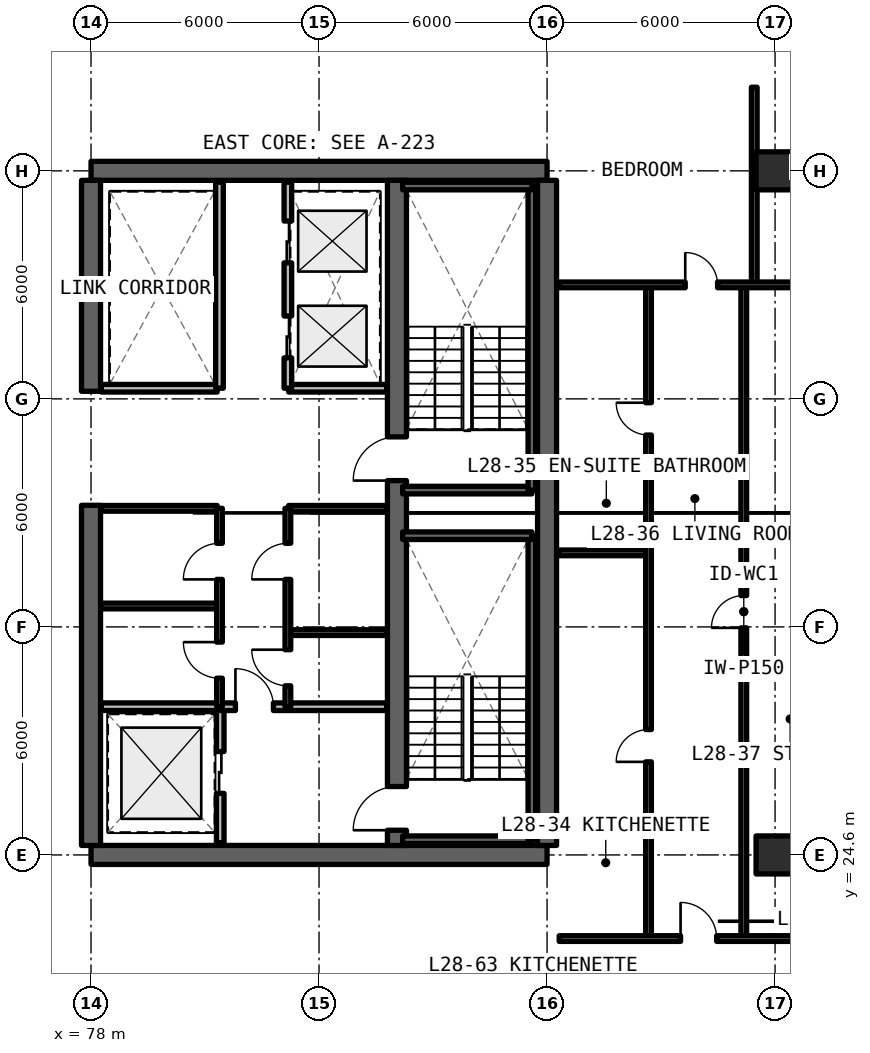
"""IFC4 building model, lengths in metres.
Left out: names, types, materials, properties, quantities, classifications, styles, units other than length and angle.
Written with IfcOpenShell. Run it as: python <this file> out.ifc"""

import sys

from ifc_helpers import new_model, si_unit, direction, frame, frame_2d, origin, origin_2d, place, context, subcontext, project, spatial, rectangle, extrude, element, fill, save


model = new_model("IFC4")
c1 = context("Model", 3, precision=1e-05, world=origin(), true_north=direction((0.0, 1.0)))
c2 = subcontext(c1, "Body", "Model", "MODEL_VIEW")
j1 = project(units=[si_unit("LENGTHUNIT", "METRE"), si_unit("PLANEANGLEUNIT", "RADIAN")], contexts=[c1])
p1 = place(None, origin())
s1 = spatial("IfcSite", under=j1, at=p1, CompositionType="ELEMENT")
p2 = place(p1, origin())
s2 = spatial("IfcBuilding", under=s1, at=p2, CompositionType="ELEMENT")
p3 = place(p2, frame((0.0, 0.0, 101.97)))
s3 = spatial("IfcBuildingStorey", under=s2, at=p3, CompositionType="ELEMENT", Elevation=101.97)
for number, where, z_axis, x_axis in (
    (1, (78.0, 24.6, 0.0), (0.0, 0.0, 1.0), (1.0, 0.0, 0.0)),
    (2, (90.0, 42.6, 0.0), (0.0, 0.0, 1.0), (-1.0, 0.0, 0.0)),
):
    element("IfcWall", number, at=place(p3, frame(where, z_axis=z_axis, x_axis=x_axis)), inside=s3, PredefinedType="SHEAR", context=c2, shape_type="SweptSolid", body=[
        extrude(rectangle(XDim=12.0, YDim=0.5, at=frame_2d((6.0, 0.0))), origin(), (0.0, 0.0, 1.0), 3.3),
    ])
p4 = place(p3, frame((90.0, 24.85, 0.0), z_axis=(0.0, 0.0, 1.0), x_axis=(0.0, 1.0, 0.0)))
e3 = element("IfcWall", 3, at=p4, inside=s3, PredefinedType="SHEAR", context=c2, shape_type="SweptSolid", body=[
    extrude(rectangle(XDim=17.5, YDim=0.5, at=frame_2d((8.75, 0.0))), origin(), (0.0, 0.0, 1.0), 3.3),
])
p5 = place(p3, frame((78.0, 24.85, 0.0), z_axis=(0.0, 0.0, 1.0), x_axis=(0.0, 1.0, 0.0)))
e4 = element("IfcWall", 4, at=p5, inside=s3, PredefinedType="SHEAR", context=c2, shape_type="SweptSolid", body=[
    extrude(rectangle(XDim=8.95, YDim=0.5, at=frame_2d((4.475, 0.0))), origin(), (0.0, 0.0, 1.0), 3.3),
])
p6 = place(p3, frame((78.0, 36.8, 0.0), z_axis=(0.0, 0.0, 1.0), x_axis=(0.0, 1.0, 0.0)))
e5 = element("IfcWall", 5, at=p6, inside=s3, PredefinedType="SHEAR", context=c2, shape_type="SweptSolid", body=[
    extrude(rectangle(XDim=5.55, YDim=0.5, at=frame_2d((2.775, 0.0))), origin(), (0.0, 0.0, 1.0), 3.3),
])
p7 = place(p3, frame((86.05, 24.85, 0.0), z_axis=(0.0, 0.0, 1.0), x_axis=(0.0, 1.0, 0.0)))
e6 = element("IfcWall", 6, at=p7, inside=s3, PredefinedType="SHEAR", context=c2, shape_type="SweptSolid", body=[
    extrude(rectangle(XDim=17.5, YDim=0.5, at=frame_2d((8.75, 0.0))), origin(), (0.0, 0.0, 1.0), 3.3),
])
p8 = place(p7, frame((0.4, 0.0, 0.0)))
e7 = element("IfcOpeningElement", 7, at=p8, cuts=e6, PredefinedType="OPENING", context=c2, shape_type="SweptSolid", body=[
    extrude(rectangle(XDim=1.15, YDim=2.15, at=frame_2d((0.575, 1.075))), frame((0.0, 0.26, 0.0), z_axis=(0.0, -1.0, 0.0), x_axis=(1.0, 0.0, 0.0)), (0.0, 0.0, 1.0), 0.52),
])
p9 = place(p7, frame((9.6, 0.0, 0.0)))
e8 = element("IfcOpeningElement", 8, at=p9, cuts=e6, PredefinedType="OPENING", context=c2, shape_type="SweptSolid", body=[
    extrude(rectangle(XDim=1.15, YDim=2.15, at=frame_2d((0.575, 1.075))), frame((0.0, 0.26, 0.0), z_axis=(0.0, -1.0, 0.0), x_axis=(1.0, 0.0, 0.0)), (0.0, 0.0, 1.0), 0.52),
])
for number, where, z_axis, x_axis in (
    (9, (96.0, 24.6, 0.0), (0.0, 0.0, 1.0), (1.0, 0.0, 0.0)),
    (10, (96.0, 42.6, 0.0), (0.0, 0.0, 1.0), (1.0, 0.0, 0.0)),
):
    element("IfcColumn", number, at=place(p3, frame(where, z_axis=z_axis, x_axis=x_axis)), inside=s3, PredefinedType="COLUMN", context=c2, shape_type="SweptSolid", body=[
        extrude(rectangle(XDim=1.0, YDim=1.0, at=origin_2d()), origin(), (0.0, 0.0, 1.0), 3.3),
    ])
p10 = place(p3, frame((81.4, 24.92, 0.0), z_axis=(0.0, 0.0, 1.0), x_axis=(0.0, 1.0, 0.0)))
e11 = element("IfcWall", 11, at=p10, inside=s3, PredefinedType="SOLIDWALL", context=c2, shape_type="SweptSolid", body=[
    extrude(rectangle(XDim=3.58, YDim=0.2, at=frame_2d((1.79, 0.0))), origin(), (0.0, 0.0, 1.0), 2.35),
])
p11 = place(p10, frame((1.3, 0.0, 0.0)))
e12 = element("IfcOpeningElement", 12, at=p11, cuts=e11, PredefinedType="OPENING", context=c2, shape_type="SweptSolid", body=[
    extrude(rectangle(XDim=1.1, YDim=2.2, at=frame_2d((0.55, 1.1))), frame((0.0, 0.11, 0.0), z_axis=(0.0, -1.0, 0.0), x_axis=(1.0, 0.0, 0.0)), (0.0, 0.0, 1.0), 0.22),
])
p12 = place(p3, frame((78.27, 28.5, 0.0), z_axis=(0.0, 0.0, 1.0), x_axis=(1.0, 0.0, 0.0)))
e13 = element("IfcWall", 13, at=p12, inside=s3, PredefinedType="SOLIDWALL", context=c2, shape_type="SweptSolid", body=[
    extrude(rectangle(XDim=7.51, YDim=0.2, at=frame_2d((3.755, 0.0))), origin(), (0.0, 0.0, 1.0), 2.35),
])
p13 = place(p12, frame((3.53, 0.0, 0.0)))
e14 = element("IfcOpeningElement", 14, at=p13, cuts=e13, PredefinedType="OPENING", context=c2, shape_type="SweptSolid", body=[
    extrude(rectangle(XDim=1.0, YDim=2.15, at=frame_2d((0.5, 1.075))), frame((0.0, 0.11, 0.0), z_axis=(0.0, -1.0, 0.0), x_axis=(1.0, 0.0, 0.0)), (0.0, 0.0, 1.0), 0.22),
])
for number, where, z_axis, x_axis in (
    (15, (83.2, 30.45, 0.0), (0.0, 0.0, 1.0), (1.0, 0.0, 0.0)),
    (16, (83.2, 33.72, 0.0), (0.0, 0.0, 1.0), (1.0, 0.0, 0.0)),
):
    element("IfcWall", number, at=place(p3, frame(where, z_axis=z_axis, x_axis=x_axis)), inside=s3, PredefinedType="SOLIDWALL", context=c2, shape_type="SweptSolid", body=[
        extrude(rectangle(XDim=2.58, YDim=0.15, at=frame_2d((1.29, 0.0))), origin(), (0.0, 0.0, 1.0), 2.35),
    ])
p14 = place(p3, frame((83.18, 28.5, 0.0), z_axis=(0.0, 0.0, 1.0), x_axis=(0.0, 1.0, 0.0)))
e17 = element("IfcWall", 17, at=p14, inside=s3, PredefinedType="SOLIDWALL", context=c2, shape_type="SweptSolid", body=[
    extrude(rectangle(XDim=5.22, YDim=0.15, at=frame_2d((2.61, 0.0))), origin(), (0.0, 0.0, 1.0), 2.35),
])
p15 = place(p14, frame((0.55, 0.0, 0.0)))
e18 = element("IfcOpeningElement", 18, at=p15, cuts=e17, PredefinedType="OPENING", context=c2, shape_type="SweptSolid", body=[
    extrude(rectangle(XDim=0.95, YDim=2.15, at=frame_2d((0.475, 1.075))), frame((0.0, 0.085, 0.0), z_axis=(0.0, -1.0, 0.0), x_axis=(1.0, 0.0, 0.0)), (0.0, 0.0, 1.0), 0.17),
])
p16 = place(p14, frame((3.35, 0.0, 0.0)))
e19 = element("IfcOpeningElement", 19, at=p16, cuts=e17, PredefinedType="OPENING", context=c2, shape_type="SweptSolid", body=[
    extrude(rectangle(XDim=0.95, YDim=2.15, at=frame_2d((0.475, 1.075))), frame((0.0, 0.085, 0.0), z_axis=(0.0, -1.0, 0.0), x_axis=(1.0, 0.0, 0.0)), (0.0, 0.0, 1.0), 0.17),
])
for number, where, z_axis, x_axis in (
    (20, (78.27, 31.15, 0.0), (0.0, 0.0, 1.0), (1.0, 0.0, 0.0)),
    (21, (78.27, 33.72, 0.0), (0.0, 0.0, 1.0), (1.0, 0.0, 0.0)),
):
    element("IfcWall", number, at=place(p3, frame(where, z_axis=z_axis, x_axis=x_axis)), inside=s3, PredefinedType="SOLIDWALL", context=c2, shape_type="SweptSolid", body=[
        extrude(rectangle(XDim=3.05, YDim=0.15, at=frame_2d((1.525, 0.0))), origin(), (0.0, 0.0, 1.0), 2.35),
    ])
p17 = place(p3, frame((81.38, 28.5, 0.0), z_axis=(0.0, 0.0, 1.0), x_axis=(0.0, 1.0, 0.0)))
e22 = element("IfcWall", 22, at=p17, inside=s3, PredefinedType="SOLIDWALL", context=c2, shape_type="SweptSolid", body=[
    extrude(rectangle(XDim=5.22, YDim=0.15, at=frame_2d((2.61, 0.0))), origin(), (0.0, 0.0, 1.0), 2.35),
])
p18 = place(p17, frame((0.75, 0.0, 0.0)))
e23 = element("IfcOpeningElement", 23, at=p18, cuts=e22, PredefinedType="OPENING", context=c2, shape_type="SweptSolid", body=[
    extrude(rectangle(XDim=0.95, YDim=2.15, at=frame_2d((0.475, 1.075))), frame((0.0, 0.085, 0.0), z_axis=(0.0, -1.0, 0.0), x_axis=(1.0, 0.0, 0.0)), (0.0, 0.0, 1.0), 0.17),
])
p19 = place(p17, frame((3.35, 0.0, 0.0)))
e24 = element("IfcOpeningElement", 24, at=p19, cuts=e22, PredefinedType="OPENING", context=c2, shape_type="SweptSolid", body=[
    extrude(rectangle(XDim=0.95, YDim=2.15, at=frame_2d((0.475, 1.075))), frame((0.0, 0.085, 0.0), z_axis=(0.0, -1.0, 0.0), x_axis=(1.0, 0.0, 0.0)), (0.0, 0.0, 1.0), 0.17),
])
p20 = place(p3, frame((83.2, 36.88, 0.0), z_axis=(0.0, 0.0, 1.0), x_axis=(1.0, 0.0, 0.0)))
e25 = element("IfcWall", 25, at=p20, inside=s3, PredefinedType="SOLIDWALL", context=c2, shape_type="SweptSolid", body=[
    extrude(rectangle(XDim=2.58, YDim=0.2, at=frame_2d((1.29, 0.0))), origin(), (0.0, 0.0, 1.0), 2.35),
])
p21 = place(p3, frame((83.18, 36.88, 0.0), z_axis=(0.0, 0.0, 1.0), x_axis=(0.0, 1.0, 0.0)))
e26 = element("IfcWall", 26, at=p21, inside=s3, PredefinedType="SOLIDWALL", context=c2, shape_type="SweptSolid", body=[
    extrude(rectangle(XDim=5.42, YDim=0.2, at=frame_2d((2.71, 0.0))), origin(), (0.0, 0.0, 1.0), 2.35),
])
p22 = place(p21, frame((0.8, 0.0, 0.0)))
e27 = element("IfcOpeningElement", 27, at=p22, cuts=e26, PredefinedType="OPENING", context=c2, shape_type="SweptSolid", body=[
    extrude(rectangle(XDim=1.1, YDim=2.2, at=frame_2d((0.55, 1.1))), frame((0.0, 0.11, 0.0), z_axis=(0.0, -1.0, 0.0), x_axis=(1.0, 0.0, 0.0)), (0.0, 0.0, 1.0), 0.22),
])
p23 = place(p21, frame((3.3, 0.0, 0.0)))
e28 = element("IfcOpeningElement", 28, at=p23, cuts=e26, PredefinedType="OPENING", context=c2, shape_type="SweptSolid", body=[
    extrude(rectangle(XDim=1.1, YDim=2.2, at=frame_2d((0.55, 1.1))), frame((0.0, 0.11, 0.0), z_axis=(0.0, -1.0, 0.0), x_axis=(1.0, 0.0, 0.0)), (0.0, 0.0, 1.0), 0.22),
])
p24 = place(p3, frame((78.27, 36.88, 0.0), z_axis=(0.0, 0.0, 1.0), x_axis=(1.0, 0.0, 0.0)))
e29 = element("IfcWall", 29, at=p24, inside=s3, PredefinedType="SOLIDWALL", context=c2, shape_type="SweptSolid", body=[
    extrude(rectangle(XDim=3.05, YDim=0.2, at=frame_2d((1.525, 0.0))), origin(), (0.0, 0.0, 1.0), 2.35),
])
p25 = place(p3, frame((81.38, 36.88, 0.0), z_axis=(0.0, 0.0, 1.0), x_axis=(0.0, 1.0, 0.0)))
e30 = element("IfcWall", 30, at=p25, inside=s3, PredefinedType="SOLIDWALL", context=c2, shape_type="SweptSolid", body=[
    extrude(rectangle(XDim=5.42, YDim=0.2, at=frame_2d((2.71, 0.0))), origin(), (0.0, 0.0, 1.0), 2.35),
])
p26 = place(p3, frame((95.177, 22.4, 0.0), z_axis=(0.0, 0.0, 1.0), x_axis=(0.0, 1.0, 0.0)))
e31 = element("IfcWall", 31, at=p26, inside=s3, PredefinedType="PARTITIONING", context=c2, shape_type="SweptSolid", body=[
    extrude(rectangle(XDim=17.2, YDim=0.15, at=frame_2d((8.6, 0.0))), origin(), (0.0, 0.0, 1.0), 2.35),
])
p27 = place(p26, frame((8.175, 0.0, 0.0)))
e32 = element("IfcOpeningElement", 32, at=p27, cuts=e31, PredefinedType="OPENING", context=c2, shape_type="SweptSolid", body=[
    extrude(rectangle(XDim=0.85, YDim=2.1, at=frame_2d((0.425, 1.05))), frame((0.0, 0.085, 0.0), z_axis=(0.0, -1.0, 0.0), x_axis=(1.0, 0.0, 0.0)), (0.0, 0.0, 1.0), 0.17),
])
p28 = place(p3, frame((90.32, 32.548, 0.0), z_axis=(0.0, 0.0, 1.0), x_axis=(1.0, 0.0, 0.0)))
e33 = element("IfcWall", 33, at=p28, inside=s3, PredefinedType="PARTITIONING", context=c2, shape_type="SweptSolid", body=[
    extrude(rectangle(XDim=2.35, YDim=0.15, at=frame_2d((1.175, 0.0))), origin(), (0.0, 0.0, 1.0), 2.35),
])
p29 = place(p3, frame((92.67, 22.4, 0.0), z_axis=(0.0, 0.0, 1.0), x_axis=(0.0, 1.0, 0.0)))
e34 = element("IfcWall", 34, at=p29, inside=s3, PredefinedType="PARTITIONING", context=c2, shape_type="SweptSolid", body=[
    extrude(rectangle(XDim=17.2, YDim=0.15, at=frame_2d((8.6, 0.0))), origin(), (0.0, 0.0, 1.0), 2.35),
])
p30 = place(p29, frame((4.649, 0.0, 0.0)))
e35 = element("IfcOpeningElement", 35, at=p30, cuts=e34, PredefinedType="OPENING", context=c2, shape_type="SweptSolid", body=[
    extrude(rectangle(XDim=0.85, YDim=2.1, at=frame_2d((0.425, 1.05))), frame((0.0, 0.085, 0.0), z_axis=(0.0, -1.0, 0.0), x_axis=(1.0, 0.0, 0.0)), (0.0, 0.0, 1.0), 0.17),
])
p31 = place(p29, frame((13.249, 0.0, 0.0)))
e36 = element("IfcOpeningElement", 36, at=p31, cuts=e34, PredefinedType="OPENING", context=c2, shape_type="SweptSolid", body=[
    extrude(rectangle(XDim=0.85, YDim=2.1, at=frame_2d((0.425, 1.05))), frame((0.0, 0.085, 0.0), z_axis=(0.0, -1.0, 0.0), x_axis=(1.0, 0.0, 0.0)), (0.0, 0.0, 1.0), 0.17),
])
p32 = place(p3, frame((95.452, 39.6, 0.0), z_axis=(0.0, 0.0, 1.0), x_axis=(0.0, 1.0, 0.0)))
e37 = element("IfcWall", 37, at=p32, inside=s3, PredefinedType="PARTITIONING", context=c2, shape_type="SweptSolid", body=[
    extrude(rectangle(XDim=5.2, YDim=0.15, at=frame_2d((2.6, 0.0))), origin(), (0.0, 0.0, 1.0), 2.35),
])
p33 = place(p3, frame((90.32, 39.6, 0.0), z_axis=(0.0, 0.0, 1.0), x_axis=(1.0, 0.0, 0.0)))
e38 = element("IfcWall", 38, at=p33, inside=s3, PredefinedType="PARTITIONING", context=c2, shape_type="SweptSolid", body=[
    extrude(rectangle(XDim=9.87, YDim=0.15, at=frame_2d((4.935, 0.0))), origin(), (0.0, 0.0, 1.0), 2.35),
])
p34 = place(p33, frame((3.316, 0.0, 0.0)))
e39 = element("IfcOpeningElement", 39, at=p34, cuts=e38, PredefinedType="OPENING", context=c2, shape_type="SweptSolid", body=[
    extrude(rectangle(XDim=0.85, YDim=2.1, at=frame_2d((0.425, 1.05))), frame((0.0, 0.085, 0.0), z_axis=(0.0, -1.0, 0.0), x_axis=(1.0, 0.0, 0.0)), (0.0, 0.0, 1.0), 0.17),
])
p35 = place(p33, frame((7.876, 0.0, 0.0)))
e40 = element("IfcOpeningElement", 40, at=p35, cuts=e38, PredefinedType="OPENING", context=c2, shape_type="SweptSolid", body=[
    extrude(rectangle(XDim=0.85, YDim=2.1, at=frame_2d((0.425, 1.05))), frame((0.0, 0.085, 0.0), z_axis=(0.0, -1.0, 0.0), x_axis=(1.0, 0.0, 0.0)), (0.0, 0.0, 1.0), 0.17),
])
p36 = place(p3, frame((90.32, 22.4, 0.0), z_axis=(0.0, 0.0, 1.0), x_axis=(1.0, 0.0, 0.0)))
e41 = element("IfcWall", 41, at=p36, inside=s3, PredefinedType="SOLIDWALL", context=c2, shape_type="SweptSolid", body=[
    extrude(rectangle(XDim=9.87, YDim=0.15, at=frame_2d((4.935, 0.0))), origin(), (0.0, 0.0, 1.0), 2.35),
])
p37 = place(p36, frame((3.193, 0.0, 0.0)))
e42 = element("IfcOpeningElement", 42, at=p37, cuts=e41, PredefinedType="OPENING", context=c2, shape_type="SweptSolid", body=[
    extrude(rectangle(XDim=0.95, YDim=2.15, at=frame_2d((0.475, 1.075))), frame((0.0, 0.085, 0.0), z_axis=(0.0, -1.0, 0.0), x_axis=(1.0, 0.0, 0.0)), (0.0, 0.0, 1.0), 0.17),
])
p38 = place(p3, frame((86.2, 25.0, 0.0), z_axis=(0.0, 0.0, 1.0), x_axis=(1.0, 0.0, 0.0)))
e43 = element("IfcWall", 43, at=p38, inside=s3, PredefinedType="SOLIDWALL", context=c2, shape_type="SweptSolid", body=[
    extrude(rectangle(XDim=3.4, YDim=0.2, at=frame_2d((1.7, 0.0))), origin(), (0.0, 0.0, 1.0), 3.3),
])
p39 = place(p3, frame((89.6, 25.0, 0.0), z_axis=(0.0, 0.0, 1.0), x_axis=(0.0, 1.0, 0.0)))
e44 = element("IfcWall", 44, at=p39, inside=s3, PredefinedType="SOLIDWALL", context=c2, shape_type="SweptSolid", body=[
    extrude(rectangle(XDim=8.0, YDim=0.2, at=frame_2d((4.0, 0.0))), origin(), (0.0, 0.0, 1.0), 3.3),
])
for number, where, z_axis, x_axis in (
    (45, (89.6, 33.0, 0.0), (0.0, 0.0, 1.0), (-1.0, 0.0, 0.0)),
    (46, (86.2, 34.2, 0.0), (0.0, 0.0, 1.0), (1.0, 0.0, 0.0)),
):
    element("IfcWall", number, at=place(p3, frame(where, z_axis=z_axis, x_axis=x_axis)), inside=s3, PredefinedType="SOLIDWALL", context=c2, shape_type="SweptSolid", body=[
        extrude(rectangle(XDim=3.4, YDim=0.2, at=frame_2d((1.7, 0.0))), origin(), (0.0, 0.0, 1.0), 3.3),
    ])
p40 = place(p3, frame((89.6, 34.2, 0.0), z_axis=(0.0, 0.0, 1.0), x_axis=(0.0, 1.0, 0.0)))
e47 = element("IfcWall", 47, at=p40, inside=s3, PredefinedType="SOLIDWALL", context=c2, shape_type="SweptSolid", body=[
    extrude(rectangle(XDim=8.0, YDim=0.2, at=frame_2d((4.0, 0.0))), origin(), (0.0, 0.0, 1.0), 3.3),
])
p41 = place(p3, frame((89.6, 42.2, 0.0), z_axis=(0.0, 0.0, 1.0), x_axis=(-1.0, 0.0, 0.0)))
e48 = element("IfcWall", 48, at=p41, inside=s3, PredefinedType="SOLIDWALL", context=c2, shape_type="SweptSolid", body=[
    extrude(rectangle(XDim=3.4, YDim=0.2, at=frame_2d((1.7, 0.0))), origin(), (0.0, 0.0, 1.0), 3.3),
])
p42 = place(p11, origin())
e49 = element("IfcDoor", 49, at=p42, inside=s3, OperationType="SLIDING_TO_LEFT", PredefinedType="DOOR", context=c2, shape_type="SweptSolid", body=[
    extrude(rectangle(XDim=1.1, YDim=2.2, at=frame_2d((0.55, 1.1))), frame((0.0, 0.025, 0.0), z_axis=(0.0, -1.0, 0.0), x_axis=(1.0, 0.0, 0.0)), (0.0, 0.0, 1.0), 0.05),
])
fill(e12, e49)
p43 = place(p13, origin())
e50 = element("IfcDoor", 50, at=p43, inside=s3, OperationType="SINGLE_SWING_LEFT", PredefinedType="DOOR", context=c2, shape_type="SweptSolid", body=[
    extrude(rectangle(XDim=1.0, YDim=2.15, at=frame_2d((0.5, 1.075))), frame((0.0, 0.025, 0.0), z_axis=(0.0, -1.0, 0.0), x_axis=(1.0, 0.0, 0.0)), (0.0, 0.0, 1.0), 0.05),
])
fill(e14, e50)
p44 = place(p15, origin())
e51 = element("IfcDoor", 51, at=p44, inside=s3, OperationType="SINGLE_SWING_RIGHT", PredefinedType="DOOR", context=c2, shape_type="SweptSolid", body=[
    extrude(rectangle(XDim=0.95, YDim=2.15, at=frame_2d((0.475, 1.075))), frame((0.0, 0.025, 0.0), z_axis=(0.0, -1.0, 0.0), x_axis=(1.0, 0.0, 0.0)), (0.0, 0.0, 1.0), 0.05),
])
fill(e18, e51)
p45 = place(p16, origin())
e52 = element("IfcDoor", 52, at=p45, inside=s3, OperationType="SINGLE_SWING_LEFT", PredefinedType="DOOR", context=c2, shape_type="SweptSolid", body=[
    extrude(rectangle(XDim=0.95, YDim=2.15, at=frame_2d((0.475, 1.075))), frame((0.0, 0.025, 0.0), z_axis=(0.0, -1.0, 0.0), x_axis=(1.0, 0.0, 0.0)), (0.0, 0.0, 1.0), 0.05),
])
fill(e19, e52)
p46 = place(p18, origin())
e53 = element("IfcDoor", 53, at=p46, inside=s3, OperationType="SINGLE_SWING_RIGHT", PredefinedType="DOOR", context=c2, shape_type="SweptSolid", body=[
    extrude(rectangle(XDim=0.95, YDim=2.15, at=frame_2d((0.475, 1.075))), frame((0.0, 0.025, 0.0), z_axis=(0.0, -1.0, 0.0), x_axis=(1.0, 0.0, 0.0)), (0.0, 0.0, 1.0), 0.05),
])
fill(e23, e53)
p47 = place(p19, origin())
e54 = element("IfcDoor", 54, at=p47, inside=s3, OperationType="SINGLE_SWING_LEFT", PredefinedType="DOOR", context=c2, shape_type="SweptSolid", body=[
    extrude(rectangle(XDim=0.95, YDim=2.15, at=frame_2d((0.475, 1.075))), frame((0.0, 0.025, 0.0), z_axis=(0.0, -1.0, 0.0), x_axis=(1.0, 0.0, 0.0)), (0.0, 0.0, 1.0), 0.05),
])
fill(e24, e54)
p48 = place(p22, origin())
e55 = element("IfcDoor", 55, at=p48, inside=s3, OperationType="SLIDING_TO_LEFT", PredefinedType="DOOR", context=c2, shape_type="SweptSolid", body=[
    extrude(rectangle(XDim=1.1, YDim=2.2, at=frame_2d((0.55, 1.1))), frame((0.0, 0.025, 0.0), z_axis=(0.0, -1.0, 0.0), x_axis=(1.0, 0.0, 0.0)), (0.0, 0.0, 1.0), 0.05),
])
fill(e27, e55)
p49 = place(p23, origin())
e56 = element("IfcDoor", 56, at=p49, inside=s3, OperationType="SLIDING_TO_RIGHT", PredefinedType="DOOR", context=c2, shape_type="SweptSolid", body=[
    extrude(rectangle(XDim=1.1, YDim=2.2, at=frame_2d((0.55, 1.1))), frame((0.0, 0.025, 0.0), z_axis=(0.0, -1.0, 0.0), x_axis=(1.0, 0.0, 0.0)), (0.0, 0.0, 1.0), 0.05),
])
fill(e28, e56)
p50 = place(p27, origin())
e57 = element("IfcDoor", 57, at=p50, inside=s3, OperationType="SINGLE_SWING_LEFT", PredefinedType="DOOR", context=c2, shape_type="SweptSolid", body=[
    extrude(rectangle(XDim=0.85, YDim=2.1, at=frame_2d((0.425, 1.05))), frame((0.0, 0.025, 0.0), z_axis=(0.0, -1.0, 0.0), x_axis=(1.0, 0.0, 0.0)), (0.0, 0.0, 1.0), 0.05),
])
fill(e32, e57)
p51 = place(p30, origin())
e58 = element("IfcDoor", 58, at=p51, inside=s3, OperationType="SINGLE_SWING_LEFT", PredefinedType="DOOR", context=c2, shape_type="SweptSolid", body=[
    extrude(rectangle(XDim=0.85, YDim=2.1, at=frame_2d((0.425, 1.05))), frame((0.0, 0.025, 0.0), z_axis=(0.0, -1.0, 0.0), x_axis=(1.0, 0.0, 0.0)), (0.0, 0.0, 1.0), 0.05),
])
fill(e35, e58)
p52 = place(p31, origin())
e59 = element("IfcDoor", 59, at=p52, inside=s3, OperationType="SINGLE_SWING_RIGHT", PredefinedType="DOOR", context=c2, shape_type="SweptSolid", body=[
    extrude(rectangle(XDim=0.85, YDim=2.1, at=frame_2d((0.425, 1.05))), frame((0.0, 0.025, 0.0), z_axis=(0.0, -1.0, 0.0), x_axis=(1.0, 0.0, 0.0)), (0.0, 0.0, 1.0), 0.05),
])
fill(e36, e59)
p53 = place(p34, origin())
e60 = element("IfcDoor", 60, at=p53, inside=s3, OperationType="SINGLE_SWING_LEFT", PredefinedType="DOOR", context=c2, shape_type="SweptSolid", body=[
    extrude(rectangle(XDim=0.85, YDim=2.1, at=frame_2d((0.425, 1.05))), frame((0.0, 0.025, 0.0), z_axis=(0.0, -1.0, 0.0), x_axis=(1.0, 0.0, 0.0)), (0.0, 0.0, 1.0), 0.05),
])
fill(e39, e60)
p54 = place(p37, origin())
e61 = element("IfcDoor", 61, at=p54, inside=s3, OperationType="SINGLE_SWING_LEFT", PredefinedType="DOOR", context=c2, shape_type="SweptSolid", body=[
    extrude(rectangle(XDim=0.95, YDim=2.15, at=frame_2d((0.475, 1.075))), frame((0.0, 0.025, 0.0), z_axis=(0.0, -1.0, 0.0), x_axis=(1.0, 0.0, 0.0)), (0.0, 0.0, 1.0), 0.05),
])
fill(e42, e61)
p55 = place(p8, origin())
e62 = element("IfcDoor", 62, at=p55, inside=s3, OperationType="SINGLE_SWING_LEFT", PredefinedType="DOOR", context=c2, shape_type="SweptSolid", body=[
    extrude(rectangle(XDim=1.15, YDim=2.15, at=frame_2d((0.575, 1.075))), frame((0.0, 0.025, 0.0), z_axis=(0.0, -1.0, 0.0), x_axis=(1.0, 0.0, 0.0)), (0.0, 0.0, 1.0), 0.05),
])
fill(e7, e62)
p56 = place(p9, origin())
e63 = element("IfcDoor", 63, at=p56, inside=s3, OperationType="SINGLE_SWING_RIGHT", PredefinedType="DOOR", context=c2, shape_type="SweptSolid", body=[
    extrude(rectangle(XDim=1.15, YDim=2.15, at=frame_2d((0.575, 1.075))), frame((0.0, 0.025, 0.0), z_axis=(0.0, -1.0, 0.0), x_axis=(1.0, 0.0, 0.0)), (0.0, 0.0, 1.0), 0.05),
])
fill(e8, e63)
save(model, sys.argv[1])
